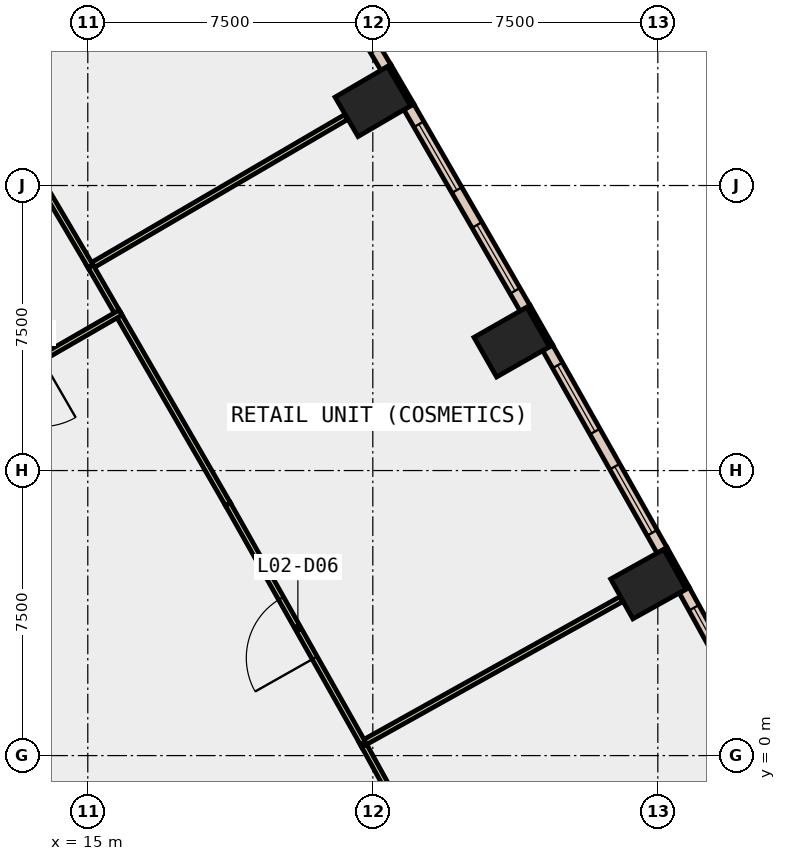
"""IFC4 building model, lengths in metres.
Left out: names, types, materials, properties, quantities, classifications, styles, units other than length and angle.
Written with IfcOpenShell. Run it as: python <this file> out.ifc"""

import sys

from ifc_helpers import new_model, si_unit, direction, frame, frame_2d, origin, origin_2d, place, context, subcontext, project, spatial, rectangle, extrude, element, fill, save


model = new_model("IFC4")
c1 = context("Model", 3, precision=1e-05, world=origin(), true_north=direction((0.0, 1.0)))
c2 = subcontext(c1, "Body", "Model", "MODEL_VIEW")
j1 = project(units=[si_unit("LENGTHUNIT", "METRE"), si_unit("PLANEANGLEUNIT", "RADIAN")], contexts=[c1])
p1 = place(None, origin())
s1 = spatial("IfcSite", under=j1, at=p1, CompositionType="ELEMENT")
p2 = place(p1, origin())
s2 = spatial("IfcBuilding", under=s1, at=p2, CompositionType="ELEMENT")
p3 = place(p2, frame((0.0, 0.0, 15.0)))
s3 = spatial("IfcBuildingStorey", under=s2, at=p3, CompositionType="ELEMENT", Elevation=15.0)
for number, where, z_axis, x_axis in (
    (1, (29.75, 4.512, -0.45), (0.0, 0.0, 1.0), (-0.487, 0.873, 0.0)),
    (2, (26.155, 10.88, -0.45), (0.0, 0.0, 1.0), (-0.496, 0.869, 0.0)),
    (3, (22.5, 17.211, -0.45), (0.0, 0.0, 1.0), (-0.504, 0.864, 0.0)),
):
    element("IfcColumn", number, at=place(p3, frame(where, z_axis=z_axis, x_axis=x_axis)), inside=s3, PredefinedType="COLUMN", context=c2, shape_type="SweptSolid", body=[
        extrude(rectangle(XDim=1.2, YDim=1.6, at=origin_2d()), origin(), (0.0, 0.0, 1.0), 5.0),
    ])
p4 = place(p3, frame((30.784, 4.402, 0.0), z_axis=(0.0, 0.0, 1.0), x_axis=(-0.486817526853, 0.873503689488, 0.0)))
e4 = element("IfcWall", 4, at=p4, inside=s3, PredefinedType="STANDARD", context=c2, shape_type="SweptSolid", body=[
    extrude(rectangle(XDim=1.2, YDim=0.1, at=frame_2d((0.6, 0.0))), origin(), (0.0, 0.0, 1.0), 4.55),
])
p5 = place(p3, frame((27.191, 10.78, 0.0), z_axis=(0.0, 0.0, 1.0), x_axis=(-0.495854054996, 0.868405870629, 0.0)))
e5 = element("IfcWall", 5, at=p5, inside=s3, PredefinedType="STANDARD", context=c2, shape_type="SweptSolid", body=[
    extrude(rectangle(XDim=1.2, YDim=0.1, at=frame_2d((0.6, 0.0))), origin(), (0.0, 0.0, 1.0), 4.55),
])
p6 = place(p3, frame((23.536, 17.122, 0.0), z_axis=(0.0, 0.0, 1.0), x_axis=(-0.504313844903, 0.863520437418, 0.0)))
e6 = element("IfcWall", 6, at=p6, inside=s3, PredefinedType="STANDARD", context=c2, shape_type="SweptSolid", body=[
    extrude(rectangle(XDim=1.2, YDim=0.1, at=frame_2d((0.6, 0.0))), origin(), (0.0, 0.0, 1.0), 4.55),
])
p7 = place(p3, frame((33.652, -1.006, 0.0), z_axis=(0.0, 0.0, 1.0), x_axis=(-0.483233380559, 0.875491576152, 0.0)))
e7 = element("IfcWall", 7, at=p7, inside=s3, PredefinedType="STANDARD", context=c2, shape_type="SweptSolid", body=[
    extrude(rectangle(XDim=6.121, YDim=0.3, at=frame_2d((3.061, 0.0))), origin(), (0.0, 0.0, 1.0), 4.55),
])
p8 = place(p7, frame((0.53, 0.0, 1.0)))
e8 = element("IfcOpeningElement", 8, at=p8, cuts=e7, PredefinedType="OPENING", context=c2, shape_type="SweptSolid", body=[
    extrude(rectangle(XDim=2.0, YDim=3.2, at=frame_2d((1.0, 1.6))), frame((0.0, 0.16, 0.0), z_axis=(0.0, -1.0, 0.0), x_axis=(1.0, 0.0, 0.0)), (0.0, 0.0, 1.0), 0.32),
])
p9 = place(p7, frame((3.591, 0.0, 1.0)))
e9 = element("IfcOpeningElement", 9, at=p9, cuts=e7, PredefinedType="OPENING", context=c2, shape_type="SweptSolid", body=[
    extrude(rectangle(XDim=2.0, YDim=3.2, at=frame_2d((1.0, 1.6))), frame((0.0, 0.16, 0.0), z_axis=(0.0, -1.0, 0.0), x_axis=(1.0, 0.0, 0.0)), (0.0, 0.0, 1.0), 0.32),
])
p10 = place(p3, frame((30.111, 5.399, 0.0), z_axis=(0.0, 0.0, 1.0), x_axis=(-0.491661677717, 0.870786308267, 0.0)))
e10 = element("IfcWall", 10, at=p10, inside=s3, PredefinedType="STANDARD", context=c2, shape_type="SweptSolid", body=[
    extrude(rectangle(XDim=6.122, YDim=0.3, at=frame_2d((3.061, 0.0))), origin(), (0.0, 0.0, 1.0), 4.55),
])
p11 = place(p10, frame((0.531, 0.0, 1.0)))
e11 = element("IfcOpeningElement", 11, at=p11, cuts=e10, PredefinedType="OPENING", context=c2, shape_type="SweptSolid", body=[
    extrude(rectangle(XDim=2.0, YDim=3.2, at=frame_2d((1.0, 1.6))), frame((0.0, 0.16, 0.0), z_axis=(0.0, -1.0, 0.0), x_axis=(1.0, 0.0, 0.0)), (0.0, 0.0, 1.0), 0.32),
])
p12 = place(p10, frame((3.592, 0.0, 1.0)))
e12 = element("IfcOpeningElement", 12, at=p12, cuts=e10, PredefinedType="OPENING", context=c2, shape_type="SweptSolid", body=[
    extrude(rectangle(XDim=2.0, YDim=3.2, at=frame_2d((1.0, 1.6))), frame((0.0, 0.16, 0.0), z_axis=(0.0, -1.0, 0.0), x_axis=(1.0, 0.0, 0.0)), (0.0, 0.0, 1.0), 0.32),
])
p13 = place(p3, frame((26.507, 11.77, 0.0), z_axis=(0.0, 0.0, 1.0), x_axis=(-0.499939977436, 0.866060055055, 0.0)))
e13 = element("IfcWall", 13, at=p13, inside=s3, PredefinedType="STANDARD", context=c2, shape_type="SweptSolid", body=[
    extrude(rectangle(XDim=6.121, YDim=0.3, at=frame_2d((3.061, 0.0))), origin(), (0.0, 0.0, 1.0), 4.55),
])
p14 = place(p13, frame((0.53, 0.0, 1.0)))
e14 = element("IfcOpeningElement", 14, at=p14, cuts=e13, PredefinedType="OPENING", context=c2, shape_type="SweptSolid", body=[
    extrude(rectangle(XDim=2.0, YDim=3.2, at=frame_2d((1.0, 1.6))), frame((0.0, 0.16, 0.0), z_axis=(0.0, -1.0, 0.0), x_axis=(1.0, 0.0, 0.0)), (0.0, 0.0, 1.0), 0.32),
])
p15 = place(p13, frame((3.591, 0.0, 1.0)))
e15 = element("IfcOpeningElement", 15, at=p15, cuts=e13, PredefinedType="OPENING", context=c2, shape_type="SweptSolid", body=[
    extrude(rectangle(XDim=2.0, YDim=3.2, at=frame_2d((1.0, 1.6))), frame((0.0, 0.16, 0.0), z_axis=(0.0, -1.0, 0.0), x_axis=(1.0, 0.0, 0.0)), (0.0, 0.0, 1.0), 0.32),
])
p16 = place(p3, frame((22.843, 18.105, 0.0), z_axis=(0.0, 0.0, 1.0), x_axis=(-0.50834231483, 0.861155091115, 0.0)))
e16 = element("IfcWall", 16, at=p16, inside=s3, PredefinedType="STANDARD", context=c2, shape_type="SweptSolid", body=[
    extrude(rectangle(XDim=6.122, YDim=0.3, at=frame_2d((3.061, 0.0))), origin(), (0.0, 0.0, 1.0), 4.55),
])
p17 = place(p16, frame((0.53, 0.0, 1.0)))
e17 = element("IfcOpeningElement", 17, at=p17, cuts=e16, PredefinedType="OPENING", context=c2, shape_type="SweptSolid", body=[
    extrude(rectangle(XDim=2.0, YDim=3.2, at=frame_2d((1.0, 1.6))), frame((0.0, 0.16, 0.0), z_axis=(0.0, -1.0, 0.0), x_axis=(1.0, 0.0, 0.0)), (0.0, 0.0, 1.0), 0.32),
])
p18 = place(p16, frame((3.591, 0.0, 1.0)))
e18 = element("IfcOpeningElement", 18, at=p18, cuts=e16, PredefinedType="OPENING", context=c2, shape_type="SweptSolid", body=[
    extrude(rectangle(XDim=2.0, YDim=3.2, at=frame_2d((1.0, 1.6))), frame((0.0, 0.16, 0.0), z_axis=(0.0, -1.0, 0.0), x_axis=(1.0, 0.0, 0.0)), (0.0, 0.0, 1.0), 0.32),
])
p19 = place(p3, frame((22.173, 0.287, 0.0), z_axis=(0.0, 0.0, 1.0), x_axis=(0.873380653813, 0.487038225959, 0.0)))
e19 = element("IfcWall", 19, at=p19, inside=s3, PredefinedType="PARTITIONING", context=c2, shape_type="SweptSolid", body=[
    extrude(rectangle(XDim=7.855, YDim=0.15, at=frame_2d((3.928, 0.0))), origin(), (0.0, 0.0, 1.0), 4.55),
])
p20 = place(p3, frame((25.733, -6.009, 0.0), z_axis=(0.0, 0.0, 1.0), x_axis=(-0.483119749012, 0.875554286218, 0.0)))
e20 = element("IfcWall", 20, at=p20, inside=s3, PredefinedType="PARTITIONING", context=c2, shape_type="SweptSolid", body=[
    extrude(rectangle(XDim=7.153, YDim=0.15, at=frame_2d((3.577, 0.0))), origin(), (0.0, 0.0, 1.0), 4.55),
])
p21 = place(p3, frame((15.009, 12.836, 0.0), z_axis=(0.0, 0.0, 1.0), x_axis=(0.863477776245, 0.50438688517, 0.0)))
e21 = element("IfcWall", 21, at=p21, inside=s3, PredefinedType="PARTITIONING", context=c2, shape_type="SweptSolid", body=[
    extrude(rectangle(XDim=7.855, YDim=0.15, at=frame_2d((3.928, 0.0))), origin(), (0.0, 0.0, 1.0), 4.55),
])
p22 = place(p3, frame((15.798, 11.621, 0.0), z_axis=(0.0, 0.0, 1.0), x_axis=(-0.500384402157, 0.865803355317, 0.0)))
e22 = element("IfcWall", 22, at=p22, inside=s3, PredefinedType="PARTITIONING", context=c2, shape_type="SweptSolid", body=[
    extrude(rectangle(XDim=1.447, YDim=0.15, at=frame_2d((0.724, 0.0))), origin(), (0.0, 0.0, 1.0), 4.55),
])
p23 = place(p3, frame((18.687, 6.616, 0.0), z_axis=(0.0, 0.0, 1.0), x_axis=(-0.499896772539, 0.866084993985, 0.0)))
e23 = element("IfcWall", 23, at=p23, inside=s3, PredefinedType="PARTITIONING", context=c2, shape_type="SweptSolid", body=[
    extrude(rectangle(XDim=5.779, YDim=0.15, at=frame_2d((2.89, 0.0))), origin(), (0.0, 0.0, 1.0), 4.55),
])
p24 = place(p3, frame((22.239, 0.324, 0.0), z_axis=(0.0, 0.0, 1.0), x_axis=(-0.491601807152, 0.870820109555, 0.0)))
e24 = element("IfcWall", 24, at=p24, inside=s3, PredefinedType="PARTITIONING", context=c2, shape_type="SweptSolid", body=[
    extrude(rectangle(XDim=7.225, YDim=0.15, at=frame_2d((3.613, 0.0))), origin(), (0.0, 0.0, 1.0), 4.55),
])
p25 = place(p24, frame((2.58, 0.0, 0.0)))
e25 = element("IfcOpeningElement", 25, at=p25, cuts=e24, PredefinedType="OPENING", context=c2, shape_type="SweptSolid", body=[
    extrude(rectangle(XDim=1.8, YDim=2.1, at=frame_2d((0.9, 1.05))), frame((0.0, 0.085, 0.0), z_axis=(0.0, -1.0, 0.0), x_axis=(1.0, 0.0, 0.0)), (0.0, 0.0, 1.0), 0.17),
])
p26 = place(p3, frame((15.073, 12.875, 0.0), z_axis=(0.0, 0.0, 1.0), x_axis=(-0.508419849244, 0.861109317621, 0.0)))
e26 = element("IfcWall", 26, at=p26, inside=s3, PredefinedType="PARTITIONING", context=c2, shape_type="SweptSolid", body=[
    extrude(rectangle(XDim=7.23, YDim=0.15, at=frame_2d((3.615, 0.0))), origin(), (0.0, 0.0, 1.0), 4.55),
])
p27 = place(p3, frame((15.863, 11.658, 0.0), z_axis=(0.0, 0.0, 1.0), x_axis=(-0.866072964545, -0.499917613297, 0.0)))
e27 = element("IfcWall", 27, at=p27, inside=s3, PredefinedType="PARTITIONING", context=c2, shape_type="SweptSolid", body=[
    extrude(rectangle(XDim=6.317, YDim=0.15, at=frame_2d((3.158, 0.0))), origin(), (0.0, 0.0, 1.0), 4.55),
])
p28 = place(p27, frame((2.404, 0.0, 0.0)))
e28 = element("IfcOpeningElement", 28, at=p28, cuts=e27, PredefinedType="OPENING", context=c2, shape_type="SweptSolid", body=[
    extrude(rectangle(XDim=1.8, YDim=2.1, at=frame_2d((0.9, 1.05))), frame((0.0, 0.085, 0.0), z_axis=(0.0, -1.0, 0.0), x_axis=(1.0, 0.0, 0.0)), (0.0, 0.0, 1.0), 0.17),
])
p29 = place(p9, origin())
e29 = element("IfcWindow", 29, at=p29, inside=s3, PartitioningType="SINGLE_PANEL", PredefinedType="WINDOW", context=c2, shape_type="SweptSolid", body=[
    extrude(rectangle(XDim=2.0, YDim=3.2, at=frame_2d((1.0, 1.6))), frame((0.0, 0.03, 0.0), z_axis=(0.0, -1.0, 0.0), x_axis=(1.0, 0.0, 0.0)), (0.0, 0.0, 1.0), 0.06),
])
fill(e9, e29)
p30 = place(p11, origin())
e30 = element("IfcWindow", 30, at=p30, inside=s3, PartitioningType="SINGLE_PANEL", PredefinedType="WINDOW", context=c2, shape_type="SweptSolid", body=[
    extrude(rectangle(XDim=2.0, YDim=3.2, at=frame_2d((1.0, 1.6))), frame((0.0, 0.03, 0.0), z_axis=(0.0, -1.0, 0.0), x_axis=(1.0, 0.0, 0.0)), (0.0, 0.0, 1.0), 0.06),
])
fill(e11, e30)
p31 = place(p12, origin())
e31 = element("IfcWindow", 31, at=p31, inside=s3, PartitioningType="SINGLE_PANEL", PredefinedType="WINDOW", context=c2, shape_type="SweptSolid", body=[
    extrude(rectangle(XDim=2.0, YDim=3.2, at=frame_2d((1.0, 1.6))), frame((0.0, 0.03, 0.0), z_axis=(0.0, -1.0, 0.0), x_axis=(1.0, 0.0, 0.0)), (0.0, 0.0, 1.0), 0.06),
])
fill(e12, e31)
p32 = place(p14, origin())
e32 = element("IfcWindow", 32, at=p32, inside=s3, PartitioningType="SINGLE_PANEL", PredefinedType="WINDOW", context=c2, shape_type="SweptSolid", body=[
    extrude(rectangle(XDim=2.0, YDim=3.2, at=frame_2d((1.0, 1.6))), frame((0.0, 0.03, 0.0), z_axis=(0.0, -1.0, 0.0), x_axis=(1.0, 0.0, 0.0)), (0.0, 0.0, 1.0), 0.06),
])
fill(e14, e32)
p33 = place(p15, origin())
e33 = element("IfcWindow", 33, at=p33, inside=s3, PartitioningType="SINGLE_PANEL", PredefinedType="WINDOW", context=c2, shape_type="SweptSolid", body=[
    extrude(rectangle(XDim=2.0, YDim=3.2, at=frame_2d((1.0, 1.6))), frame((0.0, 0.03, 0.0), z_axis=(0.0, -1.0, 0.0), x_axis=(1.0, 0.0, 0.0)), (0.0, 0.0, 1.0), 0.06),
])
fill(e15, e33)
p34 = place(p25, origin())
e34 = element("IfcDoor", 34, at=p34, inside=s3, OperationType="DOUBLE_DOOR_SINGLE_SWING", PredefinedType="DOOR", context=c2, shape_type="SweptSolid", body=[
    extrude(rectangle(XDim=1.8, YDim=2.1, at=frame_2d((0.9, 1.05))), frame((0.0, 0.025, 0.0), z_axis=(0.0, -1.0, 0.0), x_axis=(1.0, 0.0, 0.0)), (0.0, 0.0, 1.0), 0.05),
])
fill(e25, e34)
save(model, sys.argv[1])
